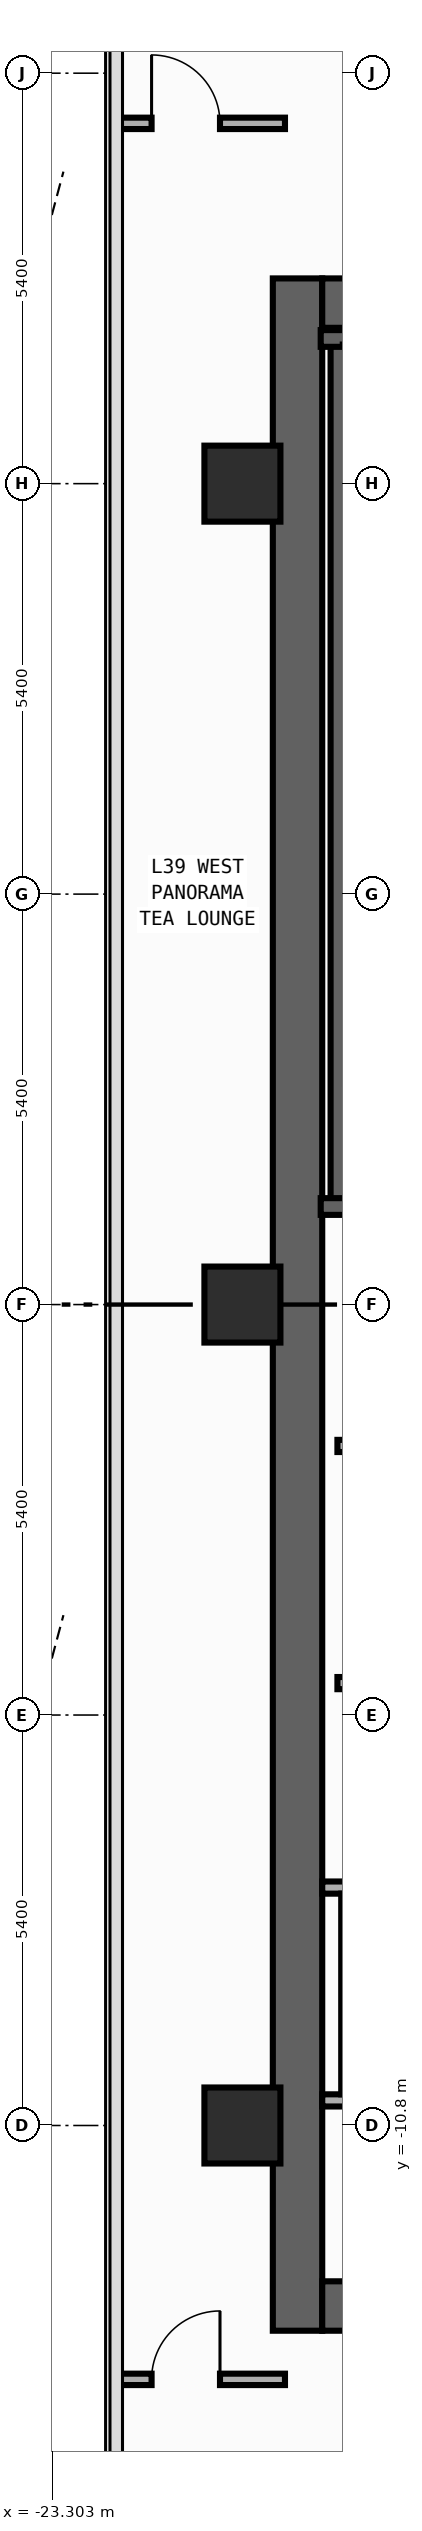
"""IFC4 building model, lengths in metres.
Left out: names, types, materials, properties, quantities, classifications, styles, units other than length and angle.
Written with IfcOpenShell. Run it as: python <this file> out.ifc"""

import sys

from ifc_helpers import new_model, si_unit, direction, frame, frame_2d, origin, origin_2d, place, context, subcontext, project, spatial, rectangle, extrude, element, fill, save


model = new_model("IFC4")
c1 = context("Model", 3, precision=1e-05, world=origin(), true_north=direction((0.0, 1.0)))
c2 = subcontext(c1, "Body", "Model", "MODEL_VIEW")
j1 = project(units=[si_unit("LENGTHUNIT", "METRE"), si_unit("PLANEANGLEUNIT", "RADIAN")], contexts=[c1])
p1 = place(None, origin())
s1 = spatial("IfcSite", under=j1, at=p1, CompositionType="ELEMENT")
p2 = place(p1, origin())
s2 = spatial("IfcBuilding", under=s1, at=p2, CompositionType="ELEMENT")
p3 = place(p2, frame((0.0, 0.0, 172.6)))
s3 = spatial("IfcBuildingStorey", under=s2, at=p3, CompositionType="ELEMENT", Elevation=172.6)
p4 = place(p3, frame((-20.075, -13.5, 0.0), z_axis=(0.0, 0.0, 1.0), x_axis=(0.0, 1.0, 0.0)))
e1 = element("IfcWall", 1, at=p4, inside=s3, PredefinedType="SHEAR", context=c2, shape_type="SweptSolid", body=[
    extrude(rectangle(XDim=27.0, YDim=0.65, at=frame_2d((13.5, 0.0))), origin(), (0.0, 0.0, 1.0), 3.54),
])
for number, where, z_axis, x_axis in (
    (2, (-19.75, -13.175, 0.0), (0.0, 0.0, 1.0), (1.0, 0.0, 0.0)),
    (3, (-19.75, 13.175, 0.0), (0.0, 0.0, 1.0), (1.0, 0.0, 0.0)),
):
    element("IfcWall", number, at=place(p3, frame(where, z_axis=z_axis, x_axis=x_axis)), inside=s3, PredefinedType="SHEAR", context=c2, shape_type="SweptSolid", body=[
        extrude(rectangle(XDim=7.1, YDim=0.65, at=frame_2d((3.55, 0.0))), origin(), (0.0, 0.0, 1.0), 3.54),
    ])
p5 = place(p3, frame((-19.53, 1.29, 0.0), z_axis=(0.0, 0.0, 1.0), x_axis=(0.0, 1.0, 0.0)))
e4 = element("IfcWall", 4, at=p5, inside=s3, PredefinedType="SHEAR", context=c2, shape_type="SweptSolid", body=[
    extrude(rectangle(XDim=11.42, YDim=0.22, at=frame_2d((5.71, 0.0))), origin(), (0.0, 0.0, 1.0), 3.54),
])
p6 = place(p3, frame((-19.77, 12.71, 0.0), z_axis=(0.0, 0.0, 1.0), x_axis=(1.0, 0.0, 0.0)))
e5 = element("IfcWall", 5, at=p6, inside=s3, PredefinedType="SHEAR", context=c2, shape_type="SweptSolid", body=[
    extrude(rectangle(XDim=4.065, YDim=0.22, at=frame_2d((2.032, 0.0))), origin(), (0.0, 0.0, 1.0), 3.54),
])
p7 = place(p3, frame((-19.77, 1.29, 0.0), z_axis=(0.0, 0.0, 1.0), x_axis=(1.0, 0.0, 0.0)))
e6 = element("IfcWall", 6, at=p7, inside=s3, PredefinedType="SHEAR", context=c2, shape_type="SweptSolid", body=[
    extrude(rectangle(XDim=4.065, YDim=0.22, at=frame_2d((2.032, 0.0))), origin(), (0.0, 0.0, 1.0), 3.54),
])
p8 = place(p7, frame((1.08, 0.0, 0.0)))
e7 = element("IfcOpeningElement", 7, at=p8, cuts=e6, PredefinedType="OPENING", context=c2, shape_type="SweptSolid", body=[
    extrude(rectangle(XDim=1.1, YDim=2.2, at=frame_2d((0.55, 1.1))), frame((0.0, 0.12, 0.0), z_axis=(0.0, -1.0, 0.0), x_axis=(1.0, 0.0, 0.0)), (0.0, 0.0, 1.0), 0.24),
])
for number, where, z_axis, x_axis in (
    (8, (-20.8, -10.8, 0.0), (0.0, 0.0, 1.0), (1.0, 0.0, 0.0)),
    (9, (-20.8, 0.0, 0.0), (0.0, 0.0, 1.0), (1.0, 0.0, 0.0)),
    (10, (-20.8, 10.8, 0.0), (0.0, 0.0, 1.0), (1.0, 0.0, 0.0)),
):
    element("IfcColumn", number, at=place(p3, frame(where, z_axis=z_axis, x_axis=x_axis)), inside=s3, PredefinedType="COLUMN", context=c2, shape_type="SweptSolid", body=[
        extrude(rectangle(XDim=1.0, YDim=1.0, at=origin_2d()), origin(), (0.0, 0.0, 1.0), 3.8),
    ])
p9 = place(p3, frame((-19.55, -1.86, 0.0), z_axis=(0.0, 0.0, 1.0), x_axis=(1.0, 0.0, 0.0)))
e11 = element("IfcWall", 11, at=p9, inside=s3, PredefinedType="STANDARD", context=c2, shape_type="SweptSolid", body=[
    extrude(rectangle(XDim=3.8, YDim=0.16, at=frame_2d((1.9, 0.0))), origin(), (0.0, 0.0, 1.0), 3.54),
])
p10 = place(p9, frame((1.18, 0.0, 0.0)))
e12 = element("IfcOpeningElement", 12, at=p10, cuts=e11, PredefinedType="OPENING", context=c2, shape_type="SweptSolid", body=[
    extrude(rectangle(XDim=1.15, YDim=2.2, at=frame_2d((0.575, 1.1))), frame((0.0, 0.09, 0.0), z_axis=(0.0, -1.0, 0.0), x_axis=(1.0, 0.0, 0.0)), (0.0, 0.0, 1.0), 0.18),
])
p11 = place(p3, frame((-19.55, -4.98, 0.0), z_axis=(0.0, 0.0, 1.0), x_axis=(1.0, 0.0, 0.0)))
e13 = element("IfcWall", 13, at=p11, inside=s3, PredefinedType="STANDARD", context=c2, shape_type="SweptSolid", body=[
    extrude(rectangle(XDim=3.8, YDim=0.16, at=frame_2d((1.9, 0.0))), origin(), (0.0, 0.0, 1.0), 3.54),
])
for number, where, z_axis, x_axis in (
    (14, (-19.75, -10.47, 0.0), (0.0, 0.0, 1.0), (1.0, 0.0, 0.0)),
    (15, (-19.75, -7.67, 0.0), (0.0, 0.0, 1.0), (1.0, 0.0, 0.0)),
):
    element("IfcWall", number, at=place(p3, frame(where, z_axis=z_axis, x_axis=x_axis)), inside=s3, PredefinedType="PARTITIONING", context=c2, shape_type="SweptSolid", body=[
        extrude(rectangle(XDim=2.44, YDim=0.16, at=frame_2d((1.22, 0.0))), origin(), (0.0, 0.0, 1.0), 3.54),
    ])
p12 = place(p3, frame((-22.455, 15.54, 0.0), z_axis=(0.0, 0.0, 1.0), x_axis=(1.0, 0.0, 0.0)))
e16 = element("IfcWall", 16, at=p12, inside=s3, PredefinedType="PARTITIONING", context=c2, shape_type="SweptSolid", body=[
    extrude(rectangle(XDim=2.215, YDim=0.15, at=frame_2d((1.107, 0.0))), origin(), (0.0, 0.0, 1.0), 3.54),
])
p13 = place(p12, frame((0.46, 0.0, 0.0)))
e17 = element("IfcOpeningElement", 17, at=p13, cuts=e16, PredefinedType="OPENING", context=c2, shape_type="SweptSolid", body=[
    extrude(rectangle(XDim=0.9, YDim=2.15, at=frame_2d((0.45, 1.075))), frame((0.0, 0.085, 0.0), z_axis=(0.0, -1.0, 0.0), x_axis=(1.0, 0.0, 0.0)), (0.0, 0.0, 1.0), 0.17),
])
p14 = place(p3, frame((-22.455, -14.14, 0.0), z_axis=(0.0, 0.0, 1.0), x_axis=(1.0, 0.0, 0.0)))
e18 = element("IfcWall", 18, at=p14, inside=s3, PredefinedType="PARTITIONING", context=c2, shape_type="SweptSolid", body=[
    extrude(rectangle(XDim=2.215, YDim=0.15, at=frame_2d((1.107, 0.0))), origin(), (0.0, 0.0, 1.0), 3.54),
])
p15 = place(p14, frame((0.46, 0.0, 0.0)))
e19 = element("IfcOpeningElement", 19, at=p15, cuts=e18, PredefinedType="OPENING", context=c2, shape_type="SweptSolid", body=[
    extrude(rectangle(XDim=0.9, YDim=2.15, at=frame_2d((0.45, 1.075))), frame((0.0, 0.085, 0.0), z_axis=(0.0, -1.0, 0.0), x_axis=(1.0, 0.0, 0.0)), (0.0, 0.0, 1.0), 0.17),
])
p16 = place(p3, frame((-19.45, -10.39, 0.0), z_axis=(0.0, 0.0, 1.0), x_axis=(0.0, 1.0, 0.0)))
e20 = element("IfcWall", 20, at=p16, inside=s3, PredefinedType="PARTITIONING", context=c2, shape_type="SweptSolid", body=[
    extrude(rectangle(XDim=2.64, YDim=0.1, at=frame_2d((1.32, 0.0))), origin(), (0.0, 0.0, 1.0), 3.54),
])
p17 = place(p13, origin())
e21 = element("IfcDoor", 21, at=p17, inside=s3, OperationType="SINGLE_SWING_LEFT", PredefinedType="DOOR", context=c2, shape_type="SweptSolid", body=[
    extrude(rectangle(XDim=0.9, YDim=2.15, at=frame_2d((0.45, 1.075))), frame((0.0, 0.025, 0.0), z_axis=(0.0, -1.0, 0.0), x_axis=(1.0, 0.0, 0.0)), (0.0, 0.0, 1.0), 0.05),
])
fill(e17, e21)
p18 = place(p15, origin())
e22 = element("IfcDoor", 22, at=p18, inside=s3, OperationType="SINGLE_SWING_RIGHT", PredefinedType="DOOR", context=c2, shape_type="SweptSolid", body=[
    extrude(rectangle(XDim=0.9, YDim=2.15, at=frame_2d((0.45, 1.075))), frame((0.0, 0.025, 0.0), z_axis=(0.0, -1.0, 0.0), x_axis=(1.0, 0.0, 0.0)), (0.0, 0.0, 1.0), 0.05),
])
fill(e19, e22)
save(model, sys.argv[1])
